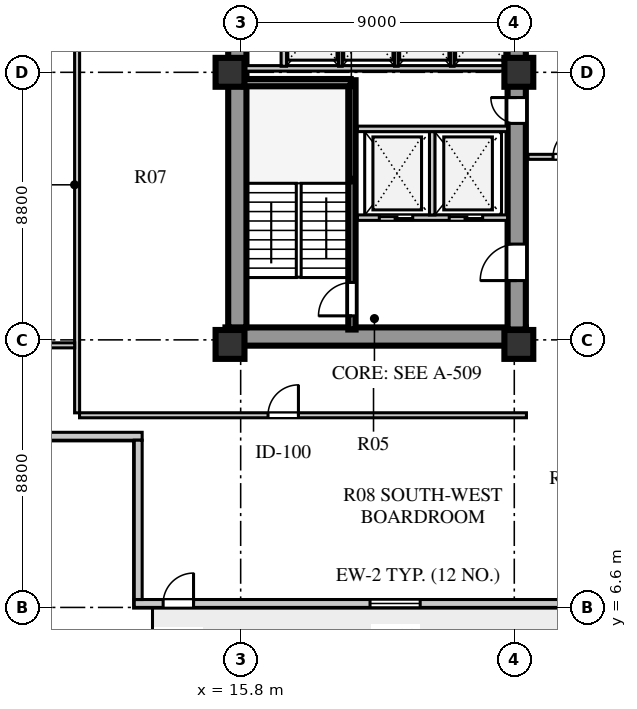
"""IFC4 building model, lengths in metres.
Left out: names, types, materials, properties, quantities, classifications, styles, units other than length and angle.
Written with IfcOpenShell. Run it as: python <this file> out.ifc"""

import sys

from ifc_helpers import new_model, si_unit, direction, frame, frame_2d, origin, origin_2d, place, context, subcontext, project, spatial, rectangle, extrude, element, fill, save


model = new_model("IFC4")
c1 = context("Model", 3, precision=1e-05, world=origin(), true_north=direction((0.0, 1.0)))
c2 = subcontext(c1, "Body", "Model", "MODEL_VIEW")
j1 = project(units=[si_unit("LENGTHUNIT", "METRE"), si_unit("PLANEANGLEUNIT", "RADIAN")], contexts=[c1])
p1 = place(None, origin())
s1 = spatial("IfcSite", under=j1, at=p1, CompositionType="ELEMENT")
p2 = place(p1, origin())
s2 = spatial("IfcBuilding", under=s1, at=p2, CompositionType="ELEMENT")
p3 = place(p2, frame((0.0, 0.0, 66.0)))
s3 = spatial("IfcBuildingStorey", under=s2, at=p3, CompositionType="ELEMENT", Elevation=66.0)
p4 = place(p3, frame((15.3, 15.51, 0.0), z_axis=(0.0, 0.0, 1.0), x_axis=(1.0, 0.0, 0.0)))
e1 = element("IfcWall", 1, at=p4, inside=s3, PredefinedType="SHEAR", context=c2, shape_type="SweptSolid", body=[
    extrude(rectangle(XDim=9.88, YDim=0.6, at=frame_2d((4.94, 0.0))), origin(), (0.0, 0.0, 1.0), 3.72),
])
p5 = place(p3, frame((15.69, 15.81, 0.0), z_axis=(0.0, 0.0, 1.0), x_axis=(0.0, 1.0, 0.0)))
e2 = element("IfcWall", 2, at=p5, inside=s3, PredefinedType="SHEAR", context=c2, shape_type="SweptSolid", body=[
    extrude(rectangle(XDim=25.63, YDim=0.6, at=frame_2d((12.815, 0.0))), origin(), (0.0, 0.0, 1.0), 3.72),
])
p6 = place(p3, frame((24.88, 15.74, 0.0), z_axis=(0.0, 0.0, 1.0), x_axis=(0.0, 1.0, 0.0)))
e3 = element("IfcWall", 3, at=p6, inside=s3, PredefinedType="SHEAR", context=c2, shape_type="SweptSolid", body=[
    extrude(rectangle(XDim=25.76, YDim=0.6, at=frame_2d((12.88, 0.0))), origin(), (0.0, 0.0, 1.0), 3.72),
])
p7 = place(p6, frame((1.61, 0.0, 0.0)))
e4 = element("IfcOpeningElement", 4, at=p7, cuts=e3, PredefinedType="OPENING", context=c2, shape_type="SweptSolid", body=[
    extrude(rectangle(XDim=1.2, YDim=2.1, at=frame_2d((0.6, 1.05))), frame((0.0, 0.31, 0.0), z_axis=(0.0, -1.0, 0.0), x_axis=(1.0, 0.0, 0.0)), (0.0, 0.0, 1.0), 0.62),
])
p8 = place(p6, frame((6.78, 0.0, 0.0)))
e5 = element("IfcOpeningElement", 5, at=p8, cuts=e3, PredefinedType="OPENING", context=c2, shape_type="SweptSolid", body=[
    extrude(rectangle(XDim=0.85, YDim=2.06, at=frame_2d((0.425, 1.03))), frame((0.0, 0.31, 0.0), z_axis=(0.0, -1.0, 0.0), x_axis=(1.0, 0.0, 0.0)), (0.0, 0.0, 1.0), 0.62),
])
p9 = place(p6, frame((12.11, 0.0, 0.0)))
e6 = element("IfcOpeningElement", 6, at=p9, cuts=e3, PredefinedType="OPENING", context=c2, shape_type="SweptSolid", body=[
    extrude(rectangle(XDim=1.5, YDim=2.12, at=frame_2d((0.75, 1.06))), frame((0.0, 0.31, 0.0), z_axis=(0.0, -1.0, 0.0), x_axis=(1.0, 0.0, 0.0)), (0.0, 0.0, 1.0), 0.62),
])
p10 = place(p6, frame((20.11, 0.0, 0.0)))
e7 = element("IfcOpeningElement", 7, at=p10, cuts=e3, PredefinedType="OPENING", context=c2, shape_type="SweptSolid", body=[
    extrude(rectangle(XDim=1.2, YDim=2.12, at=frame_2d((0.6, 1.06))), frame((0.0, 0.31, 0.0), z_axis=(0.0, -1.0, 0.0), x_axis=(1.0, 0.0, 0.0)), (0.0, 0.0, 1.0), 0.62),
])
p11 = place(p6, frame((24.01, 0.0, 0.0)))
e8 = element("IfcOpeningElement", 8, at=p11, cuts=e3, PredefinedType="OPENING", context=c2, shape_type="SweptSolid", body=[
    extrude(rectangle(XDim=0.95, YDim=2.1, at=frame_2d((0.475, 1.05))), frame((0.0, 0.31, 0.0), z_axis=(0.0, -1.0, 0.0), x_axis=(1.0, 0.0, 0.0)), (0.0, 0.0, 1.0), 0.62),
])
for number, where, z_axis, x_axis in (
    (9, (15.45, 15.25, 0.0), (0.0, 0.0, 1.0), (1.0, 0.0, 0.0)),
    (10, (15.45, 24.2, 0.0), (0.0, 0.0, 1.0), (1.0, 0.0, 0.0)),
    (11, (24.95, 15.25, 0.0), (0.0, 0.0, 1.0), (1.0, 0.0, 0.0)),
    (12, (24.95, 24.2, 0.0), (0.0, 0.0, 1.0), (1.0, 0.0, 0.0)),
):
    element("IfcColumn", number, at=place(p3, frame(where, z_axis=z_axis, x_axis=x_axis)), inside=s3, PredefinedType="COLUMN", context=c2, shape_type="SweptSolid", body=[
        extrude(rectangle(XDim=0.95, YDim=0.95, at=origin_2d()), origin(), (0.0, 0.0, 1.0), 3.72),
    ])
p12 = place(p3, frame((12.3, 6.73, 0.0), z_axis=(0.0, 0.0, 1.0), x_axis=(1.0, 0.0, 0.0)))
e13 = element("IfcWall", 13, at=p12, inside=s3, PredefinedType="SOLIDWALL", context=c2, shape_type="SweptSolid", body=[
    extrude(rectangle(XDim=34.0, YDim=0.26, at=frame_2d((17.0, 0.0))), origin(), (0.0, 0.0, 1.0), 3.72),
])
p13 = place(p12, frame((0.95, 0.0, 0.0)))
e14 = element("IfcOpeningElement", 14, at=p13, cuts=e13, PredefinedType="OPENING", context=c2, shape_type="SweptSolid", body=[
    extrude(rectangle(XDim=1.0, YDim=2.05, at=frame_2d((0.5, 1.025))), frame((0.0, 0.14, 0.0), z_axis=(0.0, -1.0, 0.0), x_axis=(1.0, 0.0, 0.0)), (0.0, 0.0, 1.0), 0.28),
])
p14 = place(p12, frame((7.755, 0.0, 0.8)))
e15 = element("IfcOpeningElement", 15, at=p14, cuts=e13, PredefinedType="OPENING", context=c2, shape_type="SweptSolid", body=[
    extrude(rectangle(XDim=1.65, YDim=1.95, at=frame_2d((0.825, 0.975))), frame((0.0, 0.14, 0.0), z_axis=(0.0, -1.0, 0.0), x_axis=(1.0, 0.0, 0.0)), (0.0, 0.0, 1.0), 0.28),
])
p15 = place(p12, frame((16.15, 0.0, 0.8)))
e16 = element("IfcOpeningElement", 16, at=p15, cuts=e13, PredefinedType="OPENING", context=c2, shape_type="SweptSolid", body=[
    extrude(rectangle(XDim=1.2, YDim=1.75, at=frame_2d((0.6, 0.875))), frame((0.0, 0.14, 0.0), z_axis=(0.0, -1.0, 0.0), x_axis=(1.0, 0.0, 0.0)), (0.0, 0.0, 1.0), 0.28),
])
p16 = place(p12, frame((18.65, 0.0, 0.8)))
e17 = element("IfcOpeningElement", 17, at=p16, cuts=e13, PredefinedType="OPENING", context=c2, shape_type="SweptSolid", body=[
    extrude(rectangle(XDim=1.2, YDim=1.75, at=frame_2d((0.6, 0.875))), frame((0.0, 0.14, 0.0), z_axis=(0.0, -1.0, 0.0), x_axis=(1.0, 0.0, 0.0)), (0.0, 0.0, 1.0), 0.28),
])
p17 = place(p12, frame((21.2, 0.0, 0.8)))
e18 = element("IfcOpeningElement", 18, at=p17, cuts=e13, PredefinedType="OPENING", context=c2, shape_type="SweptSolid", body=[
    extrude(rectangle(XDim=1.2, YDim=1.75, at=frame_2d((0.6, 0.875))), frame((0.0, 0.14, 0.0), z_axis=(0.0, -1.0, 0.0), x_axis=(1.0, 0.0, 0.0)), (0.0, 0.0, 1.0), 0.28),
])
p18 = place(p12, frame((23.71, 0.0, 0.8)))
e19 = element("IfcOpeningElement", 19, at=p18, cuts=e13, PredefinedType="OPENING", context=c2, shape_type="SweptSolid", body=[
    extrude(rectangle(XDim=1.5, YDim=2.0, at=frame_2d((0.75, 1.0))), frame((0.0, 0.14, 0.0), z_axis=(0.0, -1.0, 0.0), x_axis=(1.0, 0.0, 0.0)), (0.0, 0.0, 1.0), 0.28),
])
p19 = place(p12, frame((29.255, 0.0, 0.8)))
e20 = element("IfcOpeningElement", 20, at=p19, cuts=e13, PredefinedType="OPENING", context=c2, shape_type="SweptSolid", body=[
    extrude(rectangle(XDim=1.2, YDim=1.75, at=frame_2d((0.6, 0.875))), frame((0.0, 0.14, 0.0), z_axis=(0.0, -1.0, 0.0), x_axis=(1.0, 0.0, 0.0)), (0.0, 0.0, 1.0), 0.28),
])
p20 = place(p3, frame((6.8, 12.23, 0.0), z_axis=(0.0, 0.0, 1.0), x_axis=(1.0, 0.0, 0.0)))
e21 = element("IfcWall", 21, at=p20, inside=s3, PredefinedType="SOLIDWALL", context=c2, shape_type="SweptSolid", body=[
    extrude(rectangle(XDim=5.76, YDim=0.26, at=frame_2d((2.88, 0.0))), origin(), (0.0, 0.0, 1.0), 3.72),
])
p21 = place(p3, frame((12.43, 12.1, 0.0), z_axis=(0.0, 0.0, 1.0), x_axis=(0.0, -1.0, 0.0)))
e22 = element("IfcWall", 22, at=p21, inside=s3, PredefinedType="SOLIDWALL", context=c2, shape_type="SweptSolid", body=[
    extrude(rectangle(XDim=5.24, YDim=0.26, at=frame_2d((2.62, 0.0))), origin(), (0.0, 0.0, 1.0), 3.72),
])
p22 = place(p3, frame((19.46, 15.74, 0.0), z_axis=(0.0, 0.0, 1.0), x_axis=(0.0, 1.0, 0.0)))
e23 = element("IfcWall", 23, at=p22, inside=s3, PredefinedType="SHEAR", context=c2, shape_type="SweptSolid", body=[
    extrude(rectangle(XDim=8.2, YDim=0.24, at=frame_2d((4.1, 0.0))), origin(), (0.0, 0.0, 1.0), 4.0),
])
p23 = place(p22, frame((0.45, 0.0, 0.0)))
e24 = element("IfcOpeningElement", 24, at=p23, cuts=e23, PredefinedType="OPENING", context=c2, shape_type="SweptSolid", body=[
    extrude(rectangle(XDim=1.1, YDim=2.1, at=frame_2d((0.55, 1.05))), frame((0.0, 0.13, 0.0), z_axis=(0.0, -1.0, 0.0), x_axis=(1.0, 0.0, 0.0)), (0.0, 0.0, 1.0), 0.26),
])
p24 = place(p3, frame((15.9, 23.86, 0.0), z_axis=(0.0, 0.0, 1.0), x_axis=(1.0, 0.0, 0.0)))
e25 = element("IfcWall", 25, at=p24, inside=s3, PredefinedType="SHEAR", context=c2, shape_type="SweptSolid", body=[
    extrude(rectangle(XDim=3.52, YDim=0.24, at=frame_2d((1.76, 0.0))), origin(), (0.0, 0.0, 1.0), 4.0),
])
p25 = place(p3, frame((19.64, 19.42, 0.0), z_axis=(0.0, 0.0, 1.0), x_axis=(1.0, 0.0, 0.0)))
e26 = element("IfcWall", 26, at=p25, inside=s3, PredefinedType="SOLIDWALL", context=c2, shape_type="SweptSolid", body=[
    extrude(rectangle(XDim=4.94, YDim=0.18, at=frame_2d((2.47, 0.0))), origin(), (0.0, 0.0, 1.0), 3.72),
])
p26 = place(p25, frame((0.72, 0.0, 0.0)))
e27 = element("IfcOpeningElement", 27, at=p26, cuts=e26, PredefinedType="OPENING", context=c2, shape_type="SweptSolid", body=[
    extrude(rectangle(XDim=1.1, YDim=2.1, at=frame_2d((0.55, 1.05))), frame((0.0, 0.1, 0.0), z_axis=(0.0, -1.0, 0.0), x_axis=(1.0, 0.0, 0.0)), (0.0, 0.0, 1.0), 0.2),
])
p27 = place(p25, frame((3.02, 0.0, 0.0)))
e28 = element("IfcOpeningElement", 28, at=p27, cuts=e26, PredefinedType="OPENING", context=c2, shape_type="SweptSolid", body=[
    extrude(rectangle(XDim=1.1, YDim=2.1, at=frame_2d((0.55, 1.05))), frame((0.0, 0.1, 0.0), z_axis=(0.0, -1.0, 0.0), x_axis=(1.0, 0.0, 0.0)), (0.0, 0.0, 1.0), 0.2),
])
p28 = place(p3, frame((22.1, 19.51, 0.0), z_axis=(0.0, 0.0, 1.0), x_axis=(0.0, 1.0, 0.0)))
e29 = element("IfcWall", 29, at=p28, inside=s3, PredefinedType="SOLIDWALL", context=c2, shape_type="SweptSolid", body=[
    extrude(rectangle(XDim=2.74, YDim=0.18, at=frame_2d((1.37, 0.0))), origin(), (0.0, 0.0, 1.0), 3.72),
])
p29 = place(p3, frame((19.64, 22.34, 0.0), z_axis=(0.0, 0.0, 1.0), x_axis=(1.0, 0.0, 0.0)))
e30 = element("IfcWall", 30, at=p29, inside=s3, PredefinedType="SOLIDWALL", context=c2, shape_type="SweptSolid", body=[
    extrude(rectangle(XDim=4.94, YDim=0.18, at=frame_2d((2.47, 0.0))), origin(), (0.0, 0.0, 1.0), 3.72),
])
p30 = place(p3, frame((15.9, 24.33, 0.0), z_axis=(0.0, 0.0, 1.0), x_axis=(1.0, 0.0, 0.0)))
e31 = element("IfcWall", 31, at=p30, inside=s3, PredefinedType="SOLIDWALL", context=c2, shape_type="SweptSolid", body=[
    extrude(rectangle(XDim=8.68, YDim=0.18, at=frame_2d((4.34, 0.0))), origin(), (0.0, 0.0, 1.0), 3.02),
])
p31 = place(p3, frame((17.22, 24.4, 0.0), z_axis=(0.0, 0.0, 1.0), x_axis=(0.0, 1.0, 0.0)))
e32 = element("IfcWall", 32, at=p31, inside=s3, PredefinedType="SOLIDWALL", context=c2, shape_type="SweptSolid", body=[
    extrude(rectangle(XDim=2.05, YDim=0.18, at=frame_2d((1.025, 0.0))), origin(), (0.0, 0.0, 1.0), 3.72),
])
for number, where, z_axis, x_axis in (
    (33, (19.08, 24.4, 0.0), (0.0, 0.0, 1.0), (0.0, 1.0, 0.0)),
    (34, (20.92, 24.4, 0.0), (0.0, 0.0, 1.0), (0.0, 1.0, 0.0)),
    (35, (22.76, 24.4, 0.0), (0.0, 0.0, 1.0), (0.0, 1.0, 0.0)),
):
    element("IfcWall", number, at=place(p3, frame(where, z_axis=z_axis, x_axis=x_axis)), inside=s3, PredefinedType="PARTITIONING", context=c2, shape_type="SweptSolid", body=[
        extrude(rectangle(XDim=2.05, YDim=0.12, at=frame_2d((1.025, 0.0))), origin(), (0.0, 0.0, 1.0), 3.72),
    ])
p32 = place(p3, frame((25.25, 21.42, 0.0), z_axis=(0.0, 0.0, 1.0), x_axis=(1.0, 0.0, 0.0)))
e36 = element("IfcWall", 36, at=p32, inside=s3, PredefinedType="PARTITIONING", context=c2, shape_type="SweptSolid", body=[
    extrude(rectangle(XDim=12.87, YDim=0.165, at=frame_2d((6.435, 0.0))), origin(), (0.0, 0.0, 1.0), 3.32),
])
p33 = place(p32, frame((0.825, 0.0, 0.0)))
e37 = element("IfcOpeningElement", 37, at=p33, cuts=e36, PredefinedType="OPENING", context=c2, shape_type="SweptSolid", body=[
    extrude(rectangle(XDim=0.95, YDim=2.08, at=frame_2d((0.475, 1.04))), frame((0.0, 0.093, 0.0), z_axis=(0.0, -1.0, 0.0), x_axis=(1.0, 0.0, 0.0)), (0.0, 0.0, 1.0), 0.185),
])
p34 = place(p32, frame((3.325, 0.0, 0.0)))
e38 = element("IfcOpeningElement", 38, at=p34, cuts=e36, PredefinedType="OPENING", context=c2, shape_type="SweptSolid", body=[
    extrude(rectangle(XDim=0.95, YDim=2.08, at=frame_2d((0.475, 1.04))), frame((0.0, 0.093, 0.0), z_axis=(0.0, -1.0, 0.0), x_axis=(1.0, 0.0, 0.0)), (0.0, 0.0, 1.0), 0.185),
])
p35 = place(p32, frame((5.825, 0.0, 0.0)))
e39 = element("IfcOpeningElement", 39, at=p35, cuts=e36, PredefinedType="OPENING", context=c2, shape_type="SweptSolid", body=[
    extrude(rectangle(XDim=0.95, YDim=2.08, at=frame_2d((0.475, 1.04))), frame((0.0, 0.093, 0.0), z_axis=(0.0, -1.0, 0.0), x_axis=(1.0, 0.0, 0.0)), (0.0, 0.0, 1.0), 0.185),
])
p36 = place(p32, frame((8.375, 0.0, 0.0)))
e40 = element("IfcOpeningElement", 40, at=p36, cuts=e36, PredefinedType="OPENING", context=c2, shape_type="SweptSolid", body=[
    extrude(rectangle(XDim=0.95, YDim=2.08, at=frame_2d((0.475, 1.04))), frame((0.0, 0.093, 0.0), z_axis=(0.0, -1.0, 0.0), x_axis=(1.0, 0.0, 0.0)), (0.0, 0.0, 1.0), 0.185),
])
p37 = place(p32, frame((10.995, 0.0, 0.0)))
e41 = element("IfcOpeningElement", 41, at=p37, cuts=e36, PredefinedType="OPENING", context=c2, shape_type="SweptSolid", body=[
    extrude(rectangle(XDim=0.95, YDim=2.08, at=frame_2d((0.475, 1.04))), frame((0.0, 0.093, 0.0), z_axis=(0.0, -1.0, 0.0), x_axis=(1.0, 0.0, 0.0)), (0.0, 0.0, 1.0), 0.185),
])
p38 = place(p3, frame((10.42, 13.0, 0.0), z_axis=(0.0, 0.0, 1.0), x_axis=(0.0, 1.0, 0.0)))
e42 = element("IfcWall", 42, at=p38, inside=s3, PredefinedType="PARTITIONING", context=c2, shape_type="SweptSolid", body=[
    extrude(rectangle(XDim=31.2, YDim=0.165, at=frame_2d((15.6, 0.0))), origin(), (0.0, 0.0, 1.0), 3.72),
])
p39 = place(p38, frame((15.15, 0.0, 0.0)))
e43 = element("IfcOpeningElement", 43, at=p39, cuts=e42, PredefinedType="OPENING", context=c2, shape_type="SweptSolid", body=[
    extrude(rectangle(XDim=0.95, YDim=2.08, at=frame_2d((0.475, 1.04))), frame((0.0, 0.093, 0.0), z_axis=(0.0, -1.0, 0.0), x_axis=(1.0, 0.0, 0.0)), (0.0, 0.0, 1.0), 0.185),
])
p40 = place(p3, frame((7.08, 15.22, 0.0), z_axis=(0.0, 0.0, 1.0), x_axis=(1.0, 0.0, 0.0)))
e44 = element("IfcWall", 44, at=p40, inside=s3, PredefinedType="PARTITIONING", context=c2, shape_type="SweptSolid", body=[
    extrude(rectangle(XDim=3.26, YDim=0.165, at=frame_2d((1.63, 0.0))), origin(), (0.0, 0.0, 1.0), 3.22),
])
p41 = place(p3, frame((10.5, 12.92, 0.0), z_axis=(0.0, 0.0, 1.0), x_axis=(1.0, 0.0, 0.0)))
e45 = element("IfcWall", 45, at=p41, inside=s3, PredefinedType="PARTITIONING", context=c2, shape_type="SweptSolid", body=[
    extrude(rectangle(XDim=14.7, YDim=0.165, at=frame_2d((7.35, 0.0))), origin(), (0.0, 0.0, 1.0), 3.72),
])
p42 = place(p41, frame((6.2, 0.0, 0.0)))
e46 = element("IfcOpeningElement", 46, at=p42, cuts=e45, PredefinedType="OPENING", context=c2, shape_type="SweptSolid", body=[
    extrude(rectangle(XDim=1.0, YDim=2.08, at=frame_2d((0.5, 1.04))), frame((0.0, 0.093, 0.0), z_axis=(0.0, -1.0, 0.0), x_axis=(1.0, 0.0, 0.0)), (0.0, 0.0, 1.0), 0.185),
])
p43 = place(p13, frame((1.0, 0.0, 0.0), z_axis=(0.0, 0.0, 1.0), x_axis=(-1.0, 0.0, 0.0)))
e47 = element("IfcDoor", 47, at=p43, inside=s3, OperationType="SINGLE_SWING_LEFT", PredefinedType="DOOR", context=c2, shape_type="SweptSolid", body=[
    extrude(rectangle(XDim=1.0, YDim=2.05, at=frame_2d((0.5, 1.025))), frame((0.0, 0.025, 0.0), z_axis=(0.0, -1.0, 0.0), x_axis=(1.0, 0.0, 0.0)), (0.0, 0.0, 1.0), 0.05),
])
fill(e14, e47)
p44 = place(p14, origin())
e48 = element("IfcWindow", 48, at=p44, inside=s3, PartitioningType="SINGLE_PANEL", PredefinedType="WINDOW", context=c2, shape_type="SweptSolid", body=[
    extrude(rectangle(XDim=1.65, YDim=1.95, at=frame_2d((0.825, 0.975))), frame((0.0, 0.03, 0.0), z_axis=(0.0, -1.0, 0.0), x_axis=(1.0, 0.0, 0.0)), (0.0, 0.0, 1.0), 0.06),
])
fill(e15, e48)
p45 = place(p23, origin())
e49 = element("IfcDoor", 49, at=p45, inside=s3, OperationType="SINGLE_SWING_LEFT", PredefinedType="DOOR", context=c2, shape_type="SweptSolid", body=[
    extrude(rectangle(XDim=1.1, YDim=2.1, at=frame_2d((0.55, 1.05))), frame((0.0, 0.025, 0.0), z_axis=(0.0, -1.0, 0.0), x_axis=(1.0, 0.0, 0.0)), (0.0, 0.0, 1.0), 0.05),
])
fill(e24, e49)
p46 = place(p26, origin())
e50 = element("IfcDoor", 50, at=p46, inside=s3, OperationType="DOUBLE_DOOR_SLIDING", PredefinedType="DOOR", context=c2, shape_type="SweptSolid", body=[
    extrude(rectangle(XDim=1.1, YDim=2.1, at=frame_2d((0.55, 1.05))), frame((0.0, 0.025, 0.0), z_axis=(0.0, -1.0, 0.0), x_axis=(1.0, 0.0, 0.0)), (0.0, 0.0, 1.0), 0.05),
])
fill(e27, e50)
p47 = place(p27, origin())
e51 = element("IfcDoor", 51, at=p47, inside=s3, OperationType="DOUBLE_DOOR_SLIDING", PredefinedType="DOOR", context=c2, shape_type="SweptSolid", body=[
    extrude(rectangle(XDim=1.1, YDim=2.1, at=frame_2d((0.55, 1.05))), frame((0.0, 0.025, 0.0), z_axis=(0.0, -1.0, 0.0), x_axis=(1.0, 0.0, 0.0)), (0.0, 0.0, 1.0), 0.05),
])
fill(e28, e51)
p48 = place(p7, frame((1.2, 0.0, 0.0), z_axis=(0.0, 0.0, 1.0), x_axis=(-1.0, 0.0, 0.0)))
e52 = element("IfcDoor", 52, at=p48, inside=s3, OperationType="SINGLE_SWING_RIGHT", PredefinedType="DOOR", context=c2, shape_type="SweptSolid", body=[
    extrude(rectangle(XDim=1.2, YDim=2.1, at=frame_2d((0.6, 1.05))), frame((0.0, 0.025, 0.0), z_axis=(0.0, -1.0, 0.0), x_axis=(1.0, 0.0, 0.0)), (0.0, 0.0, 1.0), 0.05),
])
fill(e4, e52)
p49 = place(p8, frame((0.85, 0.0, 0.0), z_axis=(0.0, 0.0, 1.0), x_axis=(-1.0, 0.0, 0.0)))
e53 = element("IfcDoor", 53, at=p49, inside=s3, OperationType="SINGLE_SWING_LEFT", PredefinedType="DOOR", context=c2, shape_type="SweptSolid", body=[
    extrude(rectangle(XDim=0.85, YDim=2.06, at=frame_2d((0.425, 1.03))), frame((0.0, 0.025, 0.0), z_axis=(0.0, -1.0, 0.0), x_axis=(1.0, 0.0, 0.0)), (0.0, 0.0, 1.0), 0.05),
])
fill(e5, e53)
p50 = place(p42, frame((1.0, 0.0, 0.0), z_axis=(0.0, 0.0, 1.0), x_axis=(-1.0, 0.0, 0.0)))
e54 = element("IfcDoor", 54, at=p50, inside=s3, OperationType="SINGLE_SWING_LEFT", PredefinedType="DOOR", context=c2, shape_type="SweptSolid", body=[
    extrude(rectangle(XDim=1.0, YDim=2.08, at=frame_2d((0.5, 1.04))), frame((0.0, 0.025, 0.0), z_axis=(0.0, -1.0, 0.0), x_axis=(1.0, 0.0, 0.0)), (0.0, 0.0, 1.0), 0.05),
])
fill(e46, e54)
p51 = place(p33, frame((0.95, 0.0, 0.0), z_axis=(0.0, 0.0, 1.0), x_axis=(-1.0, 0.0, 0.0)))
e55 = element("IfcDoor", 55, at=p51, inside=s3, OperationType="SINGLE_SWING_LEFT", PredefinedType="DOOR", context=c2, shape_type="SweptSolid", body=[
    extrude(rectangle(XDim=0.95, YDim=2.08, at=frame_2d((0.475, 1.04))), frame((0.0, 0.025, 0.0), z_axis=(0.0, -1.0, 0.0), x_axis=(1.0, 0.0, 0.0)), (0.0, 0.0, 1.0), 0.05),
])
fill(e37, e55)
save(model, sys.argv[1])
